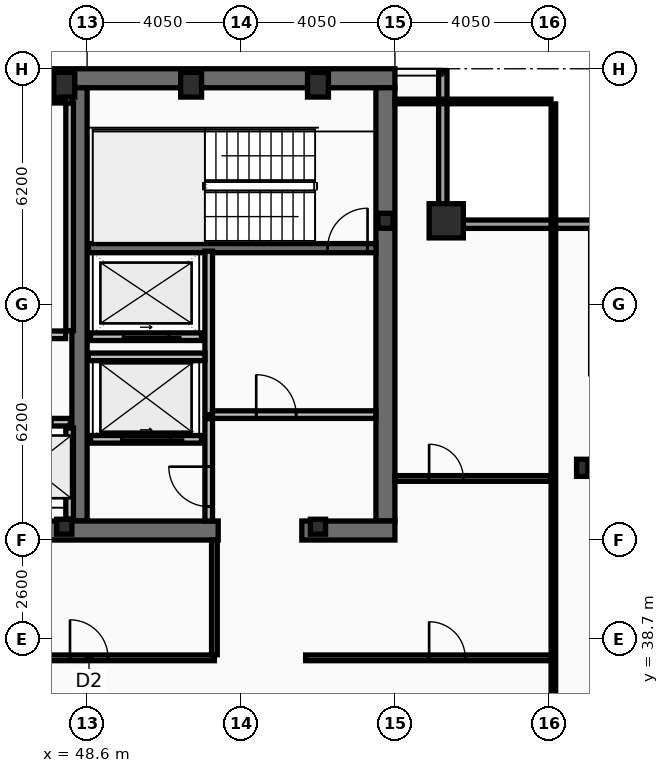
"""IFC4 building model, lengths in metres.
Left out: names, types, materials, properties, quantities, classifications, styles, units other than length and angle.
Written with IfcOpenShell. Run it as: python <this file> out.ifc"""

import sys

from ifc_helpers import new_model, si_unit, direction, frame, frame_2d, origin, origin_2d, place, context, subcontext, project, spatial, rectangle, hollow_rectangle, i_section, extrude, element, fill, save


model = new_model("IFC4")
c1 = context("Model", 3, precision=1e-05, world=origin(), true_north=direction((0.0, 1.0)))
c2 = subcontext(c1, "Body", "Model", "MODEL_VIEW")
j1 = project(units=[si_unit("LENGTHUNIT", "METRE"), si_unit("PLANEANGLEUNIT", "RADIAN")], contexts=[c1])
p1 = place(None, origin())
s1 = spatial("IfcSite", under=j1, at=p1, CompositionType="ELEMENT")
p2 = place(p1, origin())
s2 = spatial("IfcBuilding", under=s1, at=p2, CompositionType="ELEMENT")
p3 = place(p2, frame((0.0, 0.0, 291.4)))
s3 = spatial("IfcBuildingStorey", under=s2, at=p3, CompositionType="ELEMENT", Elevation=291.4)
p4 = place(p3, frame((16.2, 53.45, 0.0), z_axis=(0.0, 0.0, 1.0), x_axis=(1.0, 0.0, 0.0)))
e1 = element("IfcWall", 1, at=p4, inside=s3, PredefinedType="SHEAR", context=c2, shape_type="SweptSolid", body=[
    extrude(rectangle(XDim=40.5, YDim=0.5, at=frame_2d((20.25, 0.0))), origin(), (0.0, 0.0, 1.0), 3.44),
])
p5 = place(p3, frame((56.45, 53.2, 0.0), z_axis=(0.0, 0.0, 1.0), x_axis=(0.0, -1.0, 0.0)))
e2 = element("IfcWall", 2, at=p5, inside=s3, PredefinedType="SHEAR", context=c2, shape_type="SweptSolid", body=[
    extrude(rectangle(XDim=11.4, YDim=0.5, at=frame_2d((5.7, 0.0))), origin(), (0.0, 0.0, 1.0), 3.44),
])
p6 = place(p3, frame((48.4, 41.8, 0.0), z_axis=(0.0, 0.0, 1.0), x_axis=(0.0, 1.0, 0.0)))
e3 = element("IfcWall", 3, at=p6, inside=s3, PredefinedType="SHEAR", context=c2, shape_type="SweptSolid", body=[
    extrude(rectangle(XDim=11.4, YDim=0.4, at=frame_2d((5.7, 0.0))), origin(), (0.0, 0.0, 1.0), 3.44),
])
p7 = place(p3, frame((52.05, 41.55, 0.0), z_axis=(0.0, 0.0, 1.0), x_axis=(-1.0, 0.0, 0.0)))
e4 = element("IfcWall", 4, at=p7, inside=s3, PredefinedType="SHEAR", context=c2, shape_type="SweptSolid", body=[
    extrude(rectangle(XDim=11.3, YDim=0.5, at=frame_2d((5.65, 0.0))), origin(), (0.0, 0.0, 1.0), 3.44),
])
p8 = place(p3, frame((56.7, 41.55, 0.0), z_axis=(0.0, 0.0, 1.0), x_axis=(-1.0, 0.0, 0.0)))
e5 = element("IfcWall", 5, at=p8, inside=s3, PredefinedType="SHEAR", context=c2, shape_type="SweptSolid", body=[
    extrude(rectangle(XDim=2.45, YDim=0.5, at=frame_2d((1.225, 0.0))), origin(), (0.0, 0.0, 1.0), 3.44),
])
p9 = place(p3, frame((48.63, 48.98, 0.0), z_axis=(0.0, 0.0, 1.0), x_axis=(1.0, 0.0, 0.0)))
e6 = element("IfcWall", 6, at=p9, inside=s3, PredefinedType="SHEAR", context=c2, shape_type="SweptSolid", body=[
    extrude(rectangle(XDim=7.57, YDim=0.24, at=frame_2d((3.785, 0.0))), origin(), (0.0, 0.0, 1.0), 3.44),
])
p10 = place(p9, frame((6.3, 0.0, 0.0)))
e7 = element("IfcOpeningElement", 7, at=p10, cuts=e6, PredefinedType="OPENING", context=c2, shape_type="SweptSolid", body=[
    extrude(rectangle(XDim=1.05, YDim=2.15, at=frame_2d((0.525, 1.075))), frame((0.0, 0.13, 0.0), z_axis=(0.0, -1.0, 0.0), x_axis=(1.0, 0.0, 0.0)), (0.0, 0.0, 1.0), 0.26),
])
p11 = place(p3, frame((58.05, 49.7, 0.0), z_axis=(0.0, 0.0, 1.0), x_axis=(1.0, 0.0, 0.0)))
e8 = element("IfcColumn", 8, at=p11, inside=s3, PredefinedType="COLUMN", context=c2, shape_type="SweptSolid", body=[
    extrude(hollow_rectangle(XDim=0.9, YDim=0.9, WallThickness=0.05, at=origin_2d()), origin(), (0.0, 0.0, 1.0), 3.6),
])
for number, where, z_axis, x_axis in (
    (9, (48.0, 53.28, 0.0), (0.0, 0.0, 1.0), (1.0, 0.0, 0.0)),
    (10, (51.337, 53.28, 0.0), (0.0, 0.0, 1.0), (1.0, 0.0, 0.0)),
    (11, (54.675, 53.28, 0.0), (0.0, 0.0, 1.0), (1.0, 0.0, 0.0)),
):
    element("IfcColumn", number, at=place(p3, frame(where, z_axis=z_axis, x_axis=x_axis)), inside=s3, PredefinedType="COLUMN", context=c2, shape_type="SweptSolid", body=[
        extrude(hollow_rectangle(XDim=0.55, YDim=0.65, WallThickness=0.04, at=origin_2d()), origin(), (0.0, 0.0, 1.0), 3.6),
    ])
p12 = place(p3, frame((61.63, 43.2, 0.0), z_axis=(0.0, 0.0, 1.0), x_axis=(1.0, 0.0, 0.0)))
e12 = element("IfcColumn", 12, at=p12, inside=s3, PredefinedType="COLUMN", context=c2, shape_type="SweptSolid", body=[
    extrude(i_section(OverallWidth=0.3, OverallDepth=0.45, WebThickness=0.014, FlangeThickness=0.026, at=origin_2d()), origin(), (0.0, 0.0, 1.0), 3.6),
])
for number, where, z_axis, x_axis in (
    (13, (56.45, 49.7, 0.0), (0.0, 0.0, 1.0), (1.0, 0.0, 0.0)),
    (14, (48.0, 41.65, 0.0), (0.0, 0.0, 1.0), (1.0, 0.0, 0.0)),
    (15, (54.675, 41.65, 0.0), (0.0, 0.0, 1.0), (1.0, 0.0, 0.0)),
):
    element("IfcColumn", number, at=place(p3, frame(where, z_axis=z_axis, x_axis=x_axis)), inside=s3, PredefinedType="COLUMN", context=c2, shape_type="SweptSolid", body=[
        extrude(i_section(OverallWidth=0.399, OverallDepth=0.393, WebThickness=0.023, FlangeThickness=0.037, at=origin_2d()), origin(), (0.0, 0.0, 1.0), 3.6),
    ])
p13 = place(p3, frame((57.96, 53.63, 0.0), z_axis=(0.0, 0.0, 1.0), x_axis=(0.0, -1.0, 0.0)))
e16 = element("IfcWall", 16, at=p13, inside=s3, PredefinedType="SOLIDWALL", context=c2, shape_type="SweptSolid", body=[
    extrude(rectangle(XDim=3.91, YDim=0.22, at=frame_2d((1.955, 0.0))), origin(), (0.0, 0.0, 1.0), 2.88),
])
p14 = place(p3, frame((57.85, 49.61, 0.0), z_axis=(0.0, 0.0, 1.0), x_axis=(1.0, 0.0, 0.0)))
e17 = element("IfcWall", 17, at=p14, inside=s3, PredefinedType="SOLIDWALL", context=c2, shape_type="SweptSolid", body=[
    extrude(rectangle(XDim=4.22, YDim=0.22, at=frame_2d((2.11, 0.0))), origin(), (0.0, 0.0, 1.0), 2.88),
])
p15 = place(p3, frame((41.68, 44.4, 0.0), z_axis=(0.0, 0.0, 1.0), x_axis=(1.0, 0.0, 0.0)))
e18 = element("IfcWall", 18, at=p15, inside=s3, PredefinedType="PARTITIONING", context=c2, shape_type="SweptSolid", body=[
    extrude(rectangle(XDim=6.48, YDim=0.2, at=frame_2d((3.24, 0.0))), origin(), (0.0, 0.0, 1.0), 3.44),
])
p16 = place(p15, frame((0.58, 0.0, 0.0)))
e19 = element("IfcOpeningElement", 19, at=p16, cuts=e18, PredefinedType="OPENING", context=c2, shape_type="SweptSolid", body=[
    extrude(rectangle(XDim=1.1, YDim=2.18, at=frame_2d((0.55, 1.09))), frame((0.0, 0.11, 0.0), z_axis=(0.0, -1.0, 0.0), x_axis=(1.0, 0.0, 0.0)), (0.0, 0.0, 1.0), 0.22),
])
p17 = place(p15, frame((2.74, 0.0, 0.0)))
e20 = element("IfcOpeningElement", 20, at=p17, cuts=e18, PredefinedType="OPENING", context=c2, shape_type="SweptSolid", body=[
    extrude(rectangle(XDim=1.1, YDim=2.18, at=frame_2d((0.55, 1.09))), frame((0.0, 0.11, 0.0), z_axis=(0.0, -1.0, 0.0), x_axis=(1.0, 0.0, 0.0)), (0.0, 0.0, 1.0), 0.22),
])
p18 = place(p15, frame((4.9, 0.0, 0.0)))
e21 = element("IfcOpeningElement", 21, at=p18, cuts=e18, PredefinedType="OPENING", context=c2, shape_type="SweptSolid", body=[
    extrude(rectangle(XDim=1.1, YDim=2.18, at=frame_2d((0.55, 1.09))), frame((0.0, 0.11, 0.0), z_axis=(0.0, -1.0, 0.0), x_axis=(1.0, 0.0, 0.0)), (0.0, 0.0, 1.0), 0.22),
])
p19 = place(p3, frame((51.61, 43.95, 0.0), z_axis=(0.0, 0.0, 1.0), x_axis=(-1.0, 0.0, 0.0)))
e22 = element("IfcWall", 22, at=p19, inside=s3, PredefinedType="PARTITIONING", context=c2, shape_type="SweptSolid", body=[
    extrude(rectangle(XDim=2.92, YDim=0.2, at=frame_2d((1.46, 0.0))), origin(), (0.0, 0.0, 1.0), 3.44),
])
p20 = place(p19, frame((0.81, 0.0, 0.0)))
e23 = element("IfcOpeningElement", 23, at=p20, cuts=e22, PredefinedType="OPENING", context=c2, shape_type="SweptSolid", body=[
    extrude(rectangle(XDim=1.3, YDim=2.18, at=frame_2d((0.65, 1.09))), frame((0.0, 0.11, 0.0), z_axis=(0.0, -1.0, 0.0), x_axis=(1.0, 0.0, 0.0)), (0.0, 0.0, 1.0), 0.22),
])
p21 = place(p3, frame((51.61, 46.65, 0.0), z_axis=(0.0, 0.0, 1.0), x_axis=(-1.0, 0.0, 0.0)))
e24 = element("IfcWall", 24, at=p21, inside=s3, PredefinedType="PARTITIONING", context=c2, shape_type="SweptSolid", body=[
    extrude(rectangle(XDim=2.92, YDim=0.2, at=frame_2d((1.46, 0.0))), origin(), (0.0, 0.0, 1.0), 3.44),
])
p22 = place(p21, frame((0.86, 0.0, 0.0)))
e25 = element("IfcOpeningElement", 25, at=p22, cuts=e24, PredefinedType="OPENING", context=c2, shape_type="SweptSolid", body=[
    extrude(rectangle(XDim=1.2, YDim=2.18, at=frame_2d((0.6, 1.09))), frame((0.0, 0.11, 0.0), z_axis=(0.0, -1.0, 0.0), x_axis=(1.0, 0.0, 0.0)), (0.0, 0.0, 1.0), 0.22),
])
p23 = place(p3, frame((51.8, 44.6, 0.0), z_axis=(0.0, 0.0, 1.0), x_axis=(0.0, 1.0, 0.0)))
e26 = element("IfcWall", 26, at=p23, inside=s3, PredefinedType="PARTITIONING", context=c2, shape_type="SweptSolid", body=[
    extrude(rectangle(XDim=4.3, YDim=0.2, at=frame_2d((2.15, 0.0))), origin(), (0.0, 0.0, 1.0), 3.44),
])
p24 = place(p3, frame((51.9, 44.6, 0.0), z_axis=(0.0, 0.0, 1.0), x_axis=(1.0, 0.0, 0.0)))
e27 = element("IfcWall", 27, at=p24, inside=s3, PredefinedType="PARTITIONING", context=c2, shape_type="SweptSolid", body=[
    extrude(rectangle(XDim=4.3, YDim=0.2, at=frame_2d((2.15, 0.0))), origin(), (0.0, 0.0, 1.0), 3.44),
])
p25 = place(p24, frame((1.15, 0.0, 0.0)))
e28 = element("IfcOpeningElement", 28, at=p25, cuts=e27, PredefinedType="OPENING", context=c2, shape_type="SweptSolid", body=[
    extrude(rectangle(XDim=1.05, YDim=2.15, at=frame_2d((0.525, 1.075))), frame((0.0, 0.11, 0.0), z_axis=(0.0, -1.0, 0.0), x_axis=(1.0, 0.0, 0.0)), (0.0, 0.0, 1.0), 0.22),
])
p26 = place(p3, frame((48.63, 46.12, 0.0), z_axis=(0.0, 0.0, 1.0), x_axis=(1.0, 0.0, 0.0)))
e29 = element("IfcWall", 29, at=p26, inside=s3, PredefinedType="PARTITIONING", context=c2, shape_type="SweptSolid", body=[
    extrude(rectangle(XDim=3.07, YDim=0.2, at=frame_2d((1.535, 0.0))), origin(), (0.0, 0.0, 1.0), 3.44),
])
p27 = place(p3, frame((51.8, 41.8, 0.0), z_axis=(0.0, 0.0, 1.0), x_axis=(0.0, 1.0, 0.0)))
e30 = element("IfcWall", 30, at=p27, inside=s3, PredefinedType="PARTITIONING", context=c2, shape_type="SweptSolid", body=[
    extrude(rectangle(XDim=2.695, YDim=0.2, at=frame_2d((1.348, 0.0))), origin(), (0.0, 0.0, 1.0), 3.44),
])
p28 = place(p27, frame((0.38, 0.0, 0.0)))
e31 = element("IfcOpeningElement", 31, at=p28, cuts=e30, PredefinedType="OPENING", context=c2, shape_type="SweptSolid", body=[
    extrude(rectangle(XDim=1.05, YDim=2.15, at=frame_2d((0.525, 1.075))), frame((0.0, 0.11, 0.0), z_axis=(0.0, -1.0, 0.0), x_axis=(1.0, 0.0, 0.0)), (0.0, 0.0, 1.0), 0.22),
])
p29 = place(p3, frame((48.14, 46.805, 0.0), z_axis=(0.0, 0.0, 1.0), x_axis=(0.0, 1.0, 0.0)))
e32 = element("IfcWall", 32, at=p29, inside=s3, PredefinedType="PARTITIONING", context=c2, shape_type="SweptSolid", body=[
    extrude(rectangle(XDim=5.99, YDim=0.2, at=frame_2d((2.995, 0.0))), origin(), (0.0, 0.0, 1.0), 3.44),
])
p30 = place(p3, frame((40.685, 52.86, 0.0), z_axis=(0.0, 0.0, 1.0), x_axis=(1.0, 0.0, 0.0)))
e33 = element("IfcWall", 33, at=p30, inside=s3, PredefinedType="PARTITIONING", context=c2, shape_type="SweptSolid", body=[
    extrude(rectangle(XDim=7.35, YDim=0.12, at=frame_2d((3.675, 0.0))), origin(), (0.0, 0.0, 1.0), 3.44),
])
p31 = place(p3, frame((40.685, 46.7, 0.0), z_axis=(0.0, 0.0, 1.0), x_axis=(1.0, 0.0, 0.0)))
e34 = element("IfcWall", 34, at=p31, inside=s3, PredefinedType="PARTITIONING", context=c2, shape_type="SweptSolid", body=[
    extrude(rectangle(XDim=7.35, YDim=0.2, at=frame_2d((3.675, 0.0))), origin(), (0.0, 0.0, 1.0), 3.44),
])
p32 = place(p31, frame((1.15, 0.0, 0.0)))
e35 = element("IfcOpeningElement", 35, at=p32, cuts=e34, PredefinedType="OPENING", context=c2, shape_type="SweptSolid", body=[
    extrude(rectangle(XDim=0.95, YDim=2.1, at=frame_2d((0.475, 1.05))), frame((0.0, 0.11, 0.0), z_axis=(0.0, -1.0, 0.0), x_axis=(1.0, 0.0, 0.0)), (0.0, 0.0, 1.0), 0.22),
])
p33 = place(p31, frame((5.237, 0.0, 0.0)))
e36 = element("IfcOpeningElement", 36, at=p33, cuts=e34, PredefinedType="OPENING", context=c2, shape_type="SweptSolid", body=[
    extrude(rectangle(XDim=0.95, YDim=2.1, at=frame_2d((0.475, 1.05))), frame((0.0, 0.11, 0.0), z_axis=(0.0, -1.0, 0.0), x_axis=(1.0, 0.0, 0.0)), (0.0, 0.0, 1.0), 0.22),
])
p34 = place(p3, frame((48.14, 41.85, 0.0), z_axis=(0.0, 0.0, 1.0), x_axis=(0.0, 1.0, 0.0)))
e37 = element("IfcWall", 37, at=p34, inside=s3, PredefinedType="PARTITIONING", context=c2, shape_type="SweptSolid", body=[
    extrude(rectangle(XDim=2.4, YDim=0.2, at=frame_2d((1.2, 0.0))), origin(), (0.0, 0.0, 1.0), 3.44),
])
p35 = place(p3, frame((47.05, 38.2, 0.0), z_axis=(0.0, 0.0, 1.0), x_axis=(1.0, 0.0, 0.0)))
e38 = element("IfcWall", 38, at=p35, inside=s3, PredefinedType="PARTITIONING", context=c2, shape_type="SweptSolid", body=[
    extrude(rectangle(XDim=4.9, YDim=0.15, at=frame_2d((2.45, 0.0))), origin(), (0.0, 0.0, 1.0), 2.78),
])
p36 = place(p35, frame((1.1, 0.0, 0.0)))
e39 = element("IfcOpeningElement", 39, at=p36, cuts=e38, PredefinedType="OPENING", context=c2, shape_type="SweptSolid", body=[
    extrude(rectangle(XDim=1.0, YDim=2.05, at=frame_2d((0.5, 1.025))), frame((0.0, 0.085, 0.0), z_axis=(0.0, -1.0, 0.0), x_axis=(1.0, 0.0, 0.0)), (0.0, 0.0, 1.0), 0.17),
])
p37 = place(p3, frame((51.95, 38.28, 0.0), z_axis=(0.0, 0.0, 1.0), x_axis=(0.0, 1.0, 0.0)))
e40 = element("IfcWall", 40, at=p37, inside=s3, PredefinedType="PARTITIONING", context=c2, shape_type="SweptSolid", body=[
    extrude(rectangle(XDim=3.02, YDim=0.15, at=frame_2d((1.51, 0.0))), origin(), (0.0, 0.0, 1.0), 3.44),
])
p38 = place(p3, frame((54.35, 38.2, 0.0), z_axis=(0.0, 0.0, 1.0), x_axis=(1.0, 0.0, 0.0)))
e41 = element("IfcWall", 41, at=p38, inside=s3, PredefinedType="PARTITIONING", context=c2, shape_type="SweptSolid", body=[
    extrude(rectangle(XDim=6.52, YDim=0.15, at=frame_2d((3.26, 0.0))), origin(), (0.0, 0.0, 1.0), 2.78),
])
p39 = place(p38, frame((3.25, 0.0, 0.0)))
e42 = element("IfcOpeningElement", 42, at=p39, cuts=e41, PredefinedType="OPENING", context=c2, shape_type="SweptSolid", body=[
    extrude(rectangle(XDim=0.95, YDim=2.05, at=frame_2d((0.475, 1.025))), frame((0.0, 0.085, 0.0), z_axis=(0.0, -1.0, 0.0), x_axis=(1.0, 0.0, 0.0)), (0.0, 0.0, 1.0), 0.17),
])
p40 = place(p3, frame((56.7, 42.92, 0.0), z_axis=(0.0, 0.0, 1.0), x_axis=(1.0, 0.0, 0.0)))
e43 = element("IfcWall", 43, at=p40, inside=s3, PredefinedType="PARTITIONING", context=c2, shape_type="SweptSolid", body=[
    extrude(rectangle(XDim=4.105, YDim=0.15, at=frame_2d((2.052, 0.0))), origin(), (0.0, 0.0, 1.0), 2.78),
])
p41 = place(p40, frame((0.9, 0.0, 0.0)))
e44 = element("IfcOpeningElement", 44, at=p41, cuts=e43, PredefinedType="OPENING", context=c2, shape_type="SweptSolid", body=[
    extrude(rectangle(XDim=0.9, YDim=2.05, at=frame_2d((0.45, 1.025))), frame((0.0, 0.085, 0.0), z_axis=(0.0, -1.0, 0.0), x_axis=(1.0, 0.0, 0.0)), (0.0, 0.0, 1.0), 0.17),
])
p42 = place(p3, frame((60.87, 10.665, 0.0), z_axis=(0.0, 0.0, 1.0), x_axis=(0.0, 1.0, 0.0)))
e45 = element("IfcWall", 45, at=p42, inside=s3, PredefinedType="PARTITIONING", context=c2, shape_type="SweptSolid", body=[
    extrude(rectangle(XDim=42.11, YDim=0.12, at=frame_2d((21.055, 0.0))), origin(), (0.0, 0.0, 1.0), 2.78),
])
p43 = place(p3, frame((56.7, 52.84, 0.0), z_axis=(0.0, 0.0, 1.0), x_axis=(1.0, 0.0, 0.0)))
e46 = element("IfcWall", 46, at=p43, inside=s3, PredefinedType="PARTITIONING", context=c2, shape_type="SweptSolid", body=[
    extrude(rectangle(XDim=4.105, YDim=0.12, at=frame_2d((2.052, 0.0))), origin(), (0.0, 0.0, 1.0), 3.44),
])
p44 = place(p10, origin())
e47 = element("IfcDoor", 47, at=p44, inside=s3, OperationType="SINGLE_SWING_RIGHT", PredefinedType="DOOR", context=c2, shape_type="SweptSolid", body=[
    extrude(rectangle(XDim=1.05, YDim=2.15, at=frame_2d((0.525, 1.075))), frame((0.0, 0.025, 0.0), z_axis=(0.0, -1.0, 0.0), x_axis=(1.0, 0.0, 0.0)), (0.0, 0.0, 1.0), 0.05),
])
fill(e7, e47)
p45 = place(p18, origin())
e48 = element("IfcDoor", 48, at=p45, inside=s3, OperationType="SLIDING_TO_LEFT", PredefinedType="DOOR", context=c2, shape_type="SweptSolid", body=[
    extrude(rectangle(XDim=1.1, YDim=2.18, at=frame_2d((0.55, 1.09))), frame((0.0, 0.025, 0.0), z_axis=(0.0, -1.0, 0.0), x_axis=(1.0, 0.0, 0.0)), (0.0, 0.0, 1.0), 0.05),
])
fill(e21, e48)
p46 = place(p20, origin())
e49 = element("IfcDoor", 49, at=p46, inside=s3, OperationType="SLIDING_TO_LEFT", PredefinedType="DOOR", context=c2, shape_type="SweptSolid", body=[
    extrude(rectangle(XDim=1.3, YDim=2.18, at=frame_2d((0.65, 1.09))), frame((0.0, 0.025, 0.0), z_axis=(0.0, -1.0, 0.0), x_axis=(1.0, 0.0, 0.0)), (0.0, 0.0, 1.0), 0.05),
])
fill(e23, e49)
p47 = place(p22, origin())
e50 = element("IfcDoor", 50, at=p47, inside=s3, OperationType="SLIDING_TO_LEFT", PredefinedType="DOOR", context=c2, shape_type="SweptSolid", body=[
    extrude(rectangle(XDim=1.2, YDim=2.18, at=frame_2d((0.6, 1.09))), frame((0.0, 0.025, 0.0), z_axis=(0.0, -1.0, 0.0), x_axis=(1.0, 0.0, 0.0)), (0.0, 0.0, 1.0), 0.05),
])
fill(e25, e50)
p48 = place(p25, origin())
e51 = element("IfcDoor", 51, at=p48, inside=s3, OperationType="SINGLE_SWING_LEFT", PredefinedType="DOOR", context=c2, shape_type="SweptSolid", body=[
    extrude(rectangle(XDim=1.05, YDim=2.15, at=frame_2d((0.525, 1.075))), frame((0.0, 0.025, 0.0), z_axis=(0.0, -1.0, 0.0), x_axis=(1.0, 0.0, 0.0)), (0.0, 0.0, 1.0), 0.05),
])
fill(e28, e51)
p49 = place(p28, origin())
e52 = element("IfcDoor", 52, at=p49, inside=s3, OperationType="SINGLE_SWING_RIGHT", PredefinedType="DOOR", context=c2, shape_type="SweptSolid", body=[
    extrude(rectangle(XDim=1.05, YDim=2.15, at=frame_2d((0.525, 1.075))), frame((0.0, 0.025, 0.0), z_axis=(0.0, -1.0, 0.0), x_axis=(1.0, 0.0, 0.0)), (0.0, 0.0, 1.0), 0.05),
])
fill(e31, e52)
p50 = place(p36, origin())
e53 = element("IfcDoor", 53, at=p50, inside=s3, OperationType="SINGLE_SWING_LEFT", PredefinedType="DOOR", context=c2, shape_type="SweptSolid", body=[
    extrude(rectangle(XDim=1.0, YDim=2.05, at=frame_2d((0.5, 1.025))), frame((0.0, 0.025, 0.0), z_axis=(0.0, -1.0, 0.0), x_axis=(1.0, 0.0, 0.0)), (0.0, 0.0, 1.0), 0.05),
])
fill(e39, e53)
p51 = place(p39, origin())
e54 = element("IfcDoor", 54, at=p51, inside=s3, OperationType="SINGLE_SWING_LEFT", PredefinedType="DOOR", context=c2, shape_type="SweptSolid", body=[
    extrude(rectangle(XDim=0.95, YDim=2.05, at=frame_2d((0.475, 1.025))), frame((0.0, 0.025, 0.0), z_axis=(0.0, -1.0, 0.0), x_axis=(1.0, 0.0, 0.0)), (0.0, 0.0, 1.0), 0.05),
])
fill(e42, e54)
p52 = place(p41, origin())
e55 = element("IfcDoor", 55, at=p52, inside=s3, OperationType="SINGLE_SWING_LEFT", PredefinedType="DOOR", context=c2, shape_type="SweptSolid", body=[
    extrude(rectangle(XDim=0.9, YDim=2.05, at=frame_2d((0.45, 1.025))), frame((0.0, 0.025, 0.0), z_axis=(0.0, -1.0, 0.0), x_axis=(1.0, 0.0, 0.0)), (0.0, 0.0, 1.0), 0.05),
])
fill(e44, e55)
save(model, sys.argv[1])
